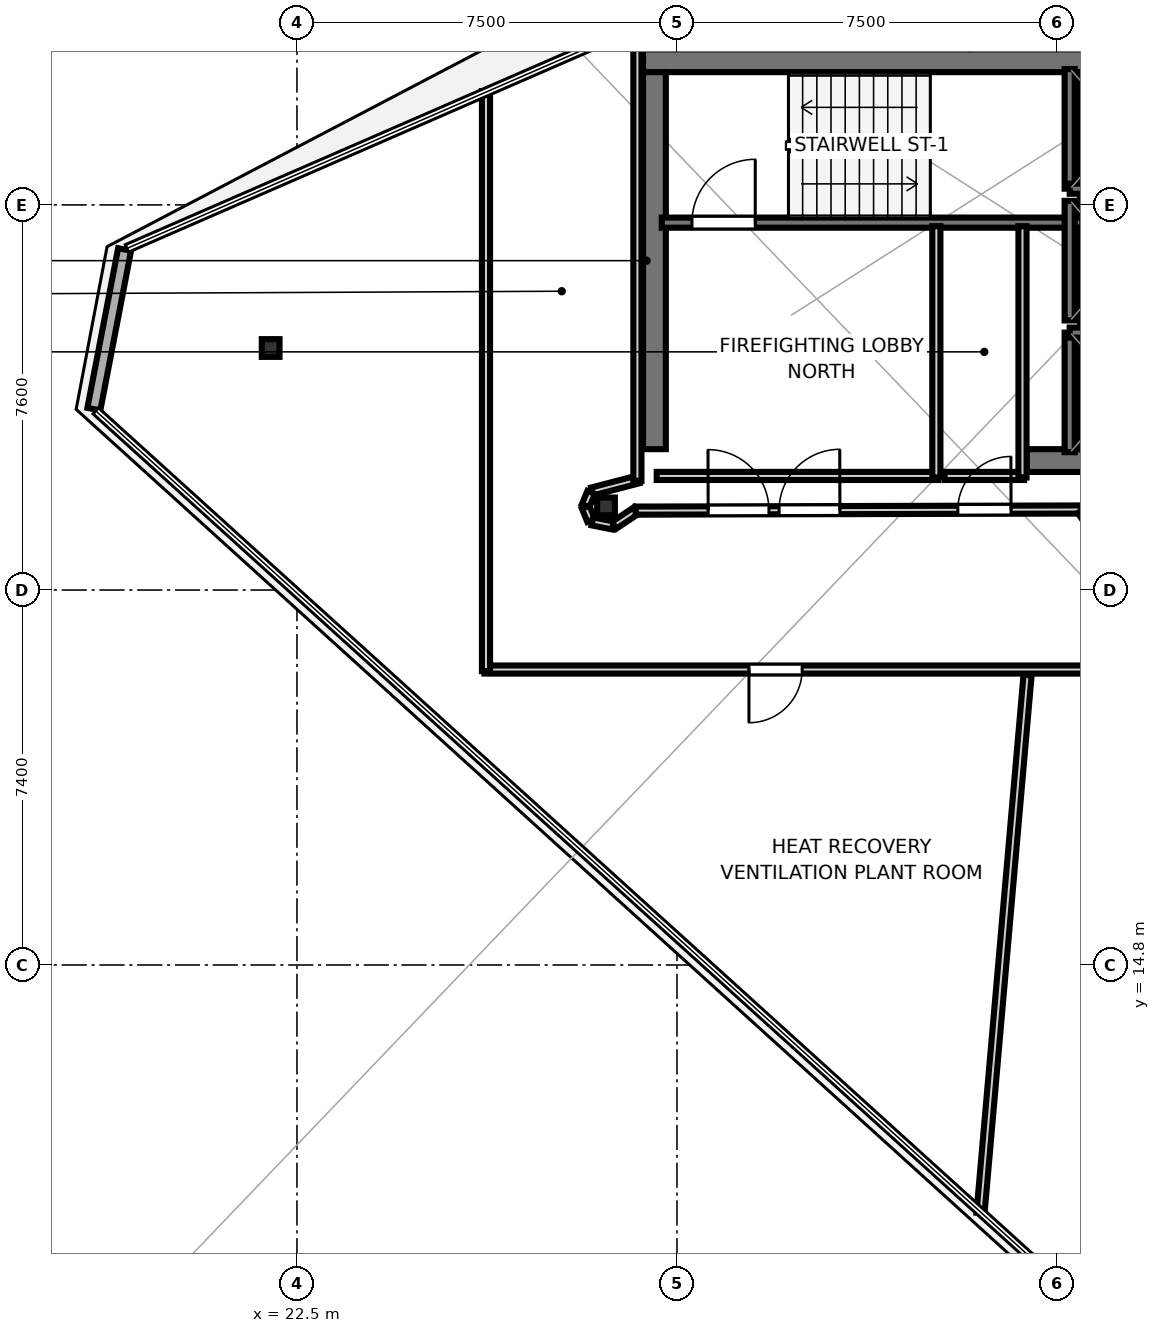
"""IFC4 building model, lengths in metres.
Left out: names, types, materials, properties, quantities, classifications, styles, units other than length and angle.
Written with IfcOpenShell. Run it as: python <this file> out.ifc"""

import sys

from ifc_helpers import new_model, si_unit, direction, frame, frame_2d, origin, origin_2d, place, context, subcontext, project, spatial, rectangle, i_section, extrude, element, fill, save


model = new_model("IFC4")
c1 = context("Model", 3, precision=1e-05, world=origin(), true_north=direction((0.0, 1.0)))
c2 = subcontext(c1, "Body", "Model", "MODEL_VIEW")
j1 = project(units=[si_unit("LENGTHUNIT", "METRE"), si_unit("PLANEANGLEUNIT", "RADIAN")], contexts=[c1])
p1 = place(None, origin())
s1 = spatial("IfcSite", under=j1, at=p1, CompositionType="ELEMENT")
p2 = place(p1, origin())
s2 = spatial("IfcBuilding", under=s1, at=p2, CompositionType="ELEMENT")
p3 = place(p2, frame((0.0, 0.0, 356.3)))
s3 = spatial("IfcBuildingStorey", under=s2, at=p3, CompositionType="ELEMENT", Elevation=356.3)
p4 = place(p3, frame((29.33, 32.645, 0.0), z_axis=(0.0, 0.0, 1.0), x_axis=(1.0, 0.0, 0.0)))
e1 = element("IfcWall", 1, at=p4, inside=s3, PredefinedType="SHEAR", context=c2, shape_type="SweptSolid", body=[
    extrude(rectangle(XDim=10.52, YDim=0.45, at=frame_2d((5.26, 0.0))), origin(), (0.0, 0.0, 1.0), 3.55),
])
p5 = place(p3, frame((36.9, 24.755, 0.0), z_axis=(0.0, 0.0, 1.0), x_axis=(1.0, 0.0, 0.0)))
e2 = element("IfcWall", 2, at=p5, inside=s3, PredefinedType="SHEAR", context=c2, shape_type="SweptSolid", body=[
    extrude(rectangle(XDim=2.95, YDim=0.45, at=frame_2d((1.475, 0.0))), origin(), (0.0, 0.0, 1.0), 3.55),
])
p6 = place(p3, frame((29.555, 24.98, 0.0), z_axis=(0.0, 0.0, 1.0), x_axis=(0.0, 1.0, 0.0)))
e3 = element("IfcWall", 3, at=p6, inside=s3, PredefinedType="SHEAR", context=c2, shape_type="SweptSolid", body=[
    extrude(rectangle(XDim=7.44, YDim=0.45, at=frame_2d((3.72, 0.0))), origin(), (0.0, 0.0, 1.0), 3.55),
])
p7 = place(p3, frame((28.6, 23.85, 0.0), z_axis=(0.0, 0.0, 1.0), x_axis=(1.0, 0.0, 0.0)))
e4 = element("IfcColumn", 4, at=p7, inside=s3, PredefinedType="COLUMN", context=c2, shape_type="SweptSolid", body=[
    extrude(i_section(OverallWidth=0.35, OverallDepth=0.35, WebThickness=0.012, FlangeThickness=0.019, at=origin_2d()), origin(), (0.0, 0.0, 1.0), 3.75),
])
p8 = place(p3, frame((21.981, 26.976, -0.25), z_axis=(0.0, 0.0, 1.0), x_axis=(1.0, 0.0, 0.0)))
e5 = element("IfcColumn", 5, at=p8, inside=s3, PredefinedType="COLUMN", context=c2, shape_type="SweptSolid", body=[
    extrude(i_section(OverallWidth=0.35, OverallDepth=0.35, WebThickness=0.012, FlangeThickness=0.019, at=origin_2d()), origin(), (0.0, 0.0, 1.0), 4.0),
])
p9 = place(p3, frame((19.098, 28.921, 0.0), z_axis=(0.0, 0.0, 1.0), x_axis=(-0.188985662005, -0.981979846818, 0.0)))
e6 = element("IfcWall", 6, at=p9, inside=s3, PredefinedType="SOLIDWALL", context=c2, shape_type="SweptSolid", body=[
    extrude(rectangle(XDim=3.209, YDim=0.26, at=frame_2d((1.604, 0.0))), origin(), (0.0, 0.0, 1.0), 3.55),
])
p10 = place(p3, frame((29.7, 29.45, 0.0), z_axis=(0.0, 0.0, 1.0), x_axis=(1.0, 0.0, 0.0)))
e7 = element("IfcWall", 7, at=p10, inside=s3, PredefinedType="SOLIDWALL", context=c2, shape_type="SweptSolid", body=[
    extrude(rectangle(XDim=8.3, YDim=0.2, at=frame_2d((4.15, 0.0))), origin(), (0.0, 0.0, 1.0), 3.55),
])
p11 = place(p10, frame((0.595, 0.0, 0.0)))
e8 = element("IfcOpeningElement", 8, at=p11, cuts=e7, PredefinedType="OPENING", context=c2, shape_type="SweptSolid", body=[
    extrude(rectangle(XDim=1.25, YDim=2.15, at=frame_2d((0.625, 1.075))), frame((0.0, 0.11, 0.0), z_axis=(0.0, -1.0, 0.0), x_axis=(1.0, 0.0, 0.0)), (0.0, 0.0, 1.0), 0.22),
])
p12 = place(p3, frame((37.75, 30.12, 0.0), z_axis=(0.0, 0.0, 1.0), x_axis=(0.0, 1.0, 0.0)))
e9 = element("IfcWall", 9, at=p12, inside=s3, PredefinedType="SOLIDWALL", context=c2, shape_type="SweptSolid", body=[
    extrude(rectangle(XDim=2.36, YDim=0.2, at=frame_2d((1.18, 0.0))), origin(), (0.0, 0.0, 1.0), 3.55),
])
p13 = place(p3, frame((37.75, 30.12, 0.0), z_axis=(0.0, 0.0, 1.0), x_axis=(1.0, 0.0, 0.0)))
e10 = element("IfcWall", 10, at=p13, inside=s3, PredefinedType="SOLIDWALL", context=c2, shape_type="SweptSolid", body=[
    extrude(rectangle(XDim=2.1, YDim=0.2, at=frame_2d((1.05, 0.0))), origin(), (0.0, 0.0, 1.0), 3.55),
])
p14 = place(p3, frame((37.75, 24.92, 0.0), z_axis=(0.0, 0.0, 1.0), x_axis=(0.0, 1.0, 0.0)))
e11 = element("IfcWall", 11, at=p14, inside=s3, PredefinedType="SOLIDWALL", context=c2, shape_type="SweptSolid", body=[
    extrude(rectangle(XDim=2.36, YDim=0.2, at=frame_2d((1.18, 0.0))), origin(), (0.0, 0.0, 1.0), 3.55),
])
p15 = place(p3, frame((37.75, 27.28, 0.0), z_axis=(0.0, 0.0, 1.0), x_axis=(1.0, 0.0, 0.0)))
e12 = element("IfcWall", 12, at=p15, inside=s3, PredefinedType="SOLIDWALL", context=c2, shape_type="SweptSolid", body=[
    extrude(rectangle(XDim=2.1, YDim=0.2, at=frame_2d((1.05, 0.0))), origin(), (0.0, 0.0, 1.0), 3.55),
])
p16 = place(p3, frame((37.75, 27.52, 0.0), z_axis=(0.0, 0.0, 1.0), x_axis=(0.0, 1.0, 0.0)))
e13 = element("IfcWall", 13, at=p16, inside=s3, PredefinedType="SOLIDWALL", context=c2, shape_type="SweptSolid", body=[
    extrude(rectangle(XDim=2.36, YDim=0.2, at=frame_2d((1.18, 0.0))), origin(), (0.0, 0.0, 1.0), 3.55),
])
p17 = place(p3, frame((35.15, 24.451, 0.0), z_axis=(0.0, 0.0, 1.0), x_axis=(-1.0, 0.0, 0.0)))
e14 = element("IfcWall", 14, at=p17, inside=s3, PredefinedType="PARTITIONING", context=c2, shape_type="SweptSolid", body=[
    extrude(rectangle(XDim=5.55, YDim=0.16, at=frame_2d((2.775, 0.0))), origin(), (0.0, 0.0, 1.0), 2.87),
])
p18 = place(p3, frame((35.119, 29.38, 0.0), z_axis=(0.0, 0.0, 1.0), x_axis=(0.0, -1.0, 0.0)))
e15 = element("IfcWall", 15, at=p18, inside=s3, PredefinedType="PARTITIONING", context=c2, shape_type="SweptSolid", body=[
    extrude(rectangle(XDim=4.96, YDim=0.16, at=frame_2d((2.48, 0.0))), origin(), (0.0, 0.0, 1.0), 2.08),
])
p19 = place(p3, frame((36.85, 24.451, 0.0), z_axis=(0.0, 0.0, 1.0), x_axis=(-1.0, 0.0, 0.0)))
e16 = element("IfcWall", 16, at=p19, inside=s3, PredefinedType="PARTITIONING", context=c2, shape_type="SweptSolid", body=[
    extrude(rectangle(XDim=1.57, YDim=0.16, at=frame_2d((0.785, 0.0))), origin(), (0.0, 0.0, 1.0), 2.87),
])
p20 = place(p3, frame((36.819, 29.38, 0.0), z_axis=(0.0, 0.0, 1.0), x_axis=(0.0, -1.0, 0.0)))
e17 = element("IfcWall", 17, at=p20, inside=s3, PredefinedType="PARTITIONING", context=c2, shape_type="SweptSolid", body=[
    extrude(rectangle(XDim=4.96, YDim=0.16, at=frame_2d((2.48, 0.0))), origin(), (0.0, 0.0, 1.0), 2.87),
])
p21 = place(p3, frame((29.242, 24.384, 0.0), z_axis=(0.0, 0.0, 1.0), x_axis=(-0.967554205956, -0.252663528309, 0.0)))
e18 = element("IfcWall", 18, at=p21, inside=s3, PredefinedType="PARTITIONING", context=c2, shape_type="SweptSolid", body=[
    extrude(rectangle(XDim=0.946, YDim=0.16, at=frame_2d((0.473, 0.0))), origin(), (0.0, 0.0, 1.0), 2.87),
])
for number, where, z_axis, x_axis in (
    (19, (28.306, 24.127, 0.0), (0.0, 0.0, 1.0), (-0.383, -0.924, 0.0)),
    (20, (28.196, 23.838, 0.0), (0.0, 0.0, 1.0), (0.383, -0.924, 0.0)),
):
    element("IfcWall", number, at=place(p3, frame(where, z_axis=z_axis, x_axis=x_axis)), inside=s3, PredefinedType="PARTITIONING", context=c2, shape_type="SweptSolid", body=[
        extrude(rectangle(XDim=0.287, YDim=0.16, at=frame_2d((0.144, 0.0))), origin(), (0.0, 0.0, 1.0), 2.87),
    ])
p22 = place(p3, frame((28.329, 23.554, 0.0), z_axis=(0.0, 0.0, 1.0), x_axis=(0.980782960085, -0.195101986683, 0.0)))
e21 = element("IfcWall", 21, at=p22, inside=s3, PredefinedType="PARTITIONING", context=c2, shape_type="SweptSolid", body=[
    extrude(rectangle(XDim=0.417, YDim=0.16, at=frame_2d((0.208, 0.0))), origin(), (0.0, 0.0, 1.0), 2.87),
])
p23 = place(p3, frame((28.761, 23.478, 0.0), z_axis=(0.0, 0.0, 1.0), x_axis=(0.831482899293, 0.555550347118, 0.0)))
e22 = element("IfcWall", 22, at=p23, inside=s3, PredefinedType="PARTITIONING", context=c2, shape_type="SweptSolid", body=[
    extrude(rectangle(XDim=0.53, YDim=0.16, at=frame_2d((0.265, 0.0))), origin(), (0.0, 0.0, 1.0), 2.87),
])
p24 = place(p3, frame((29.184, 23.767, 0.0), z_axis=(0.0, 0.0, 1.0), x_axis=(0.999996878137, 0.002498742824, 0.0)))
e23 = element("IfcWall", 23, at=p24, inside=s3, PredefinedType="PARTITIONING", context=c2, shape_type="SweptSolid", body=[
    extrude(rectangle(XDim=8.793, YDim=0.16, at=frame_2d((4.397, 0.0))), origin(), (0.0, 0.0, 1.0), 2.87),
])
p25 = place(p24, frame((2.831, 0.0, 0.0)))
e24 = element("IfcOpeningElement", 24, at=p25, cuts=e23, PredefinedType="OPENING", context=c2, shape_type="SweptSolid", body=[
    extrude(rectangle(XDim=1.2, YDim=2.15, at=frame_2d((0.6, 1.075))), frame((0.0, 0.09, 0.0), z_axis=(0.0, -1.0, 0.0), x_axis=(1.0, 0.0, 0.0)), (0.0, 0.0, 1.0), 0.18),
])
p26 = place(p24, frame((6.359, 0.0, 0.0)))
e25 = element("IfcOpeningElement", 25, at=p26, cuts=e23, PredefinedType="OPENING", context=c2, shape_type="SweptSolid", body=[
    extrude(rectangle(XDim=1.05, YDim=2.15, at=frame_2d((0.525, 1.075))), frame((0.0, 0.09, 0.0), z_axis=(0.0, -1.0, 0.0), x_axis=(1.0, 0.0, 0.0)), (0.0, 0.0, 1.0), 0.18),
])
p27 = place(p24, frame((1.431, 0.0, 0.0)))
e26 = element("IfcOpeningElement", 26, at=p27, cuts=e23, PredefinedType="OPENING", context=c2, shape_type="SweptSolid", body=[
    extrude(rectangle(XDim=1.2, YDim=2.15, at=frame_2d((0.6, 1.075))), frame((0.0, 0.09, 0.0), z_axis=(0.0, -1.0, 0.0), x_axis=(1.0, 0.0, 0.0)), (0.0, 0.0, 1.0), 0.18),
])
p28 = place(p3, frame((37.978, 23.764, 0.0), z_axis=(0.0, 0.0, 1.0), x_axis=(0.556130652598, -0.831094878604, 0.0)))
e27 = element("IfcWall", 27, at=p28, inside=s3, PredefinedType="PARTITIONING", context=c2, shape_type="SweptSolid", body=[
    extrude(rectangle(XDim=0.236, YDim=0.16, at=frame_2d((0.118, 0.0))), origin(), (0.0, 0.0, 1.0), 2.87),
])
p29 = place(p3, frame((42.4, 20.631, 0.0), z_axis=(0.0, 0.0, 1.0), x_axis=(-1.0, 0.0, 0.0)))
e28 = element("IfcWall", 28, at=p29, inside=s3, PredefinedType="PARTITIONING", context=c2, shape_type="SweptSolid", body=[
    extrude(rectangle(XDim=16.2, YDim=0.16, at=frame_2d((8.1, 0.0))), origin(), (0.0, 0.0, 1.0), 2.87),
])
p30 = place(p29, frame((9.929, 0.0, 0.0)))
e29 = element("IfcOpeningElement", 29, at=p30, cuts=e28, PredefinedType="OPENING", context=c2, shape_type="SweptSolid", body=[
    extrude(rectangle(XDim=1.05, YDim=2.15, at=frame_2d((0.525, 1.075))), frame((0.0, 0.09, 0.0), z_axis=(0.0, -1.0, 0.0), x_axis=(1.0, 0.0, 0.0)), (0.0, 0.0, 1.0), 0.18),
])
p31 = place(p3, frame((26.231, 20.6, 0.0), z_axis=(0.0, 0.0, 1.0), x_axis=(0.0, 1.0, 0.0)))
e30 = element("IfcWall", 30, at=p31, inside=s3, PredefinedType="PARTITIONING", context=c2, shape_type="SweptSolid", body=[
    extrude(rectangle(XDim=11.447, YDim=0.16, at=frame_2d((5.723, 0.0))), origin(), (0.0, 0.0, 1.0), 2.87),
])
p32 = place(p3, frame((29.219, 33.348, 0.0), z_axis=(0.0, 0.0, 1.0), x_axis=(0.0, -1.0, 0.0)))
e31 = element("IfcWall", 31, at=p32, inside=s3, PredefinedType="PARTITIONING", context=c2, shape_type="SweptSolid", body=[
    extrude(rectangle(XDim=8.993, YDim=0.16, at=frame_2d((4.497, 0.0))), origin(), (0.0, 0.0, 1.0), 2.87),
])
p33 = place(p3, frame((36.919, 20.523, 0.0), z_axis=(0.0, 0.0, 1.0), x_axis=(-0.087148482425, -0.996195333261, 0.0)))
e32 = element("IfcWall", 32, at=p33, inside=s3, PredefinedType="PARTITIONING", context=c2, shape_type="SweptSolid", body=[
    extrude(rectangle(XDim=10.659, YDim=0.16, at=frame_2d((5.33, 0.0))), origin(), (0.0, 0.0, 1.0), 2.87),
])
p34 = place(p11, origin())
e33 = element("IfcDoor", 33, at=p34, inside=s3, OperationType="SINGLE_SWING_RIGHT", PredefinedType="DOOR", context=c2, shape_type="SweptSolid", body=[
    extrude(rectangle(XDim=1.25, YDim=2.15, at=frame_2d((0.625, 1.075))), frame((0.0, 0.025, 0.0), z_axis=(0.0, -1.0, 0.0), x_axis=(1.0, 0.0, 0.0)), (0.0, 0.0, 1.0), 0.05),
])
fill(e8, e33)
p35 = place(p25, origin())
e34 = element("IfcDoor", 34, at=p35, inside=s3, OperationType="SINGLE_SWING_RIGHT", PredefinedType="DOOR", context=c2, shape_type="SweptSolid", body=[
    extrude(rectangle(XDim=1.2, YDim=2.15, at=frame_2d((0.6, 1.075))), frame((0.0, 0.025, 0.0), z_axis=(0.0, -1.0, 0.0), x_axis=(1.0, 0.0, 0.0)), (0.0, 0.0, 1.0), 0.05),
])
fill(e24, e34)
p36 = place(p26, origin())
e35 = element("IfcDoor", 35, at=p36, inside=s3, OperationType="SINGLE_SWING_RIGHT", PredefinedType="DOOR", context=c2, shape_type="SweptSolid", body=[
    extrude(rectangle(XDim=1.05, YDim=2.15, at=frame_2d((0.525, 1.075))), frame((0.0, 0.025, 0.0), z_axis=(0.0, -1.0, 0.0), x_axis=(1.0, 0.0, 0.0)), (0.0, 0.0, 1.0), 0.05),
])
fill(e25, e35)
p37 = place(p27, origin())
e36 = element("IfcDoor", 36, at=p37, inside=s3, OperationType="SINGLE_SWING_LEFT", PredefinedType="DOOR", context=c2, shape_type="SweptSolid", body=[
    extrude(rectangle(XDim=1.2, YDim=2.15, at=frame_2d((0.6, 1.075))), frame((0.0, 0.025, 0.0), z_axis=(0.0, -1.0, 0.0), x_axis=(1.0, 0.0, 0.0)), (0.0, 0.0, 1.0), 0.05),
])
fill(e26, e36)
p38 = place(p30, origin())
e37 = element("IfcDoor", 37, at=p38, inside=s3, OperationType="SINGLE_SWING_RIGHT", PredefinedType="DOOR", context=c2, shape_type="SweptSolid", body=[
    extrude(rectangle(XDim=1.05, YDim=2.15, at=frame_2d((0.525, 1.075))), frame((0.0, 0.025, 0.0), z_axis=(0.0, -1.0, 0.0), x_axis=(1.0, 0.0, 0.0)), (0.0, 0.0, 1.0), 0.05),
])
fill(e29, e37)
save(model, sys.argv[1])
